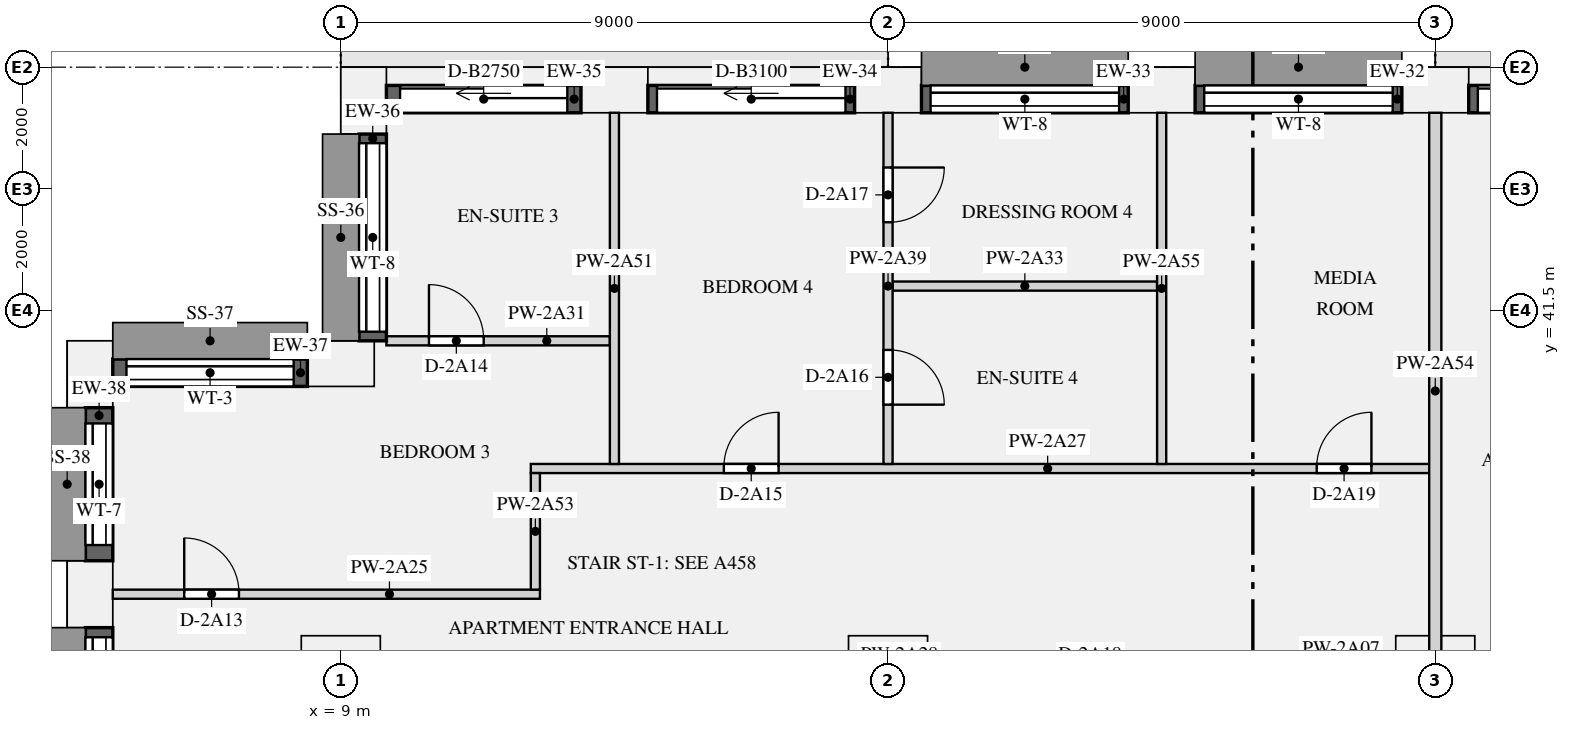
"""IFC4 building model, lengths in metres.
Left out: names, types, materials, properties, quantities, classifications, styles, units other than length and angle.
Written with IfcOpenShell. Run it as: python <this file> out.ifc"""

import sys

from ifc_helpers import new_model, si_unit, direction, frame, frame_2d, origin, origin_2d, place, context, subcontext, project, spatial, rectangle, extrude, element, fill, save


model = new_model("IFC4")
c1 = context("Model", 3, precision=1e-05, world=origin(), true_north=direction((0.0, 1.0)))
c2 = subcontext(c1, "Body", "Model", "MODEL_VIEW")
j1 = project(units=[si_unit("LENGTHUNIT", "METRE"), si_unit("PLANEANGLEUNIT", "RADIAN")], contexts=[c1])
p1 = place(None, origin())
s1 = spatial("IfcSite", under=j1, at=p1, CompositionType="ELEMENT")
p2 = place(p1, origin())
s2 = spatial("IfcBuilding", under=s1, at=p2, CompositionType="ELEMENT")
p3 = place(p2, frame((0.0, 0.0, 83.55)))
s3 = spatial("IfcBuildingStorey", under=s2, at=p3, CompositionType="ELEMENT", Elevation=83.55)
for number, where, z_axis, x_axis in (
    (1, (27.0, 45.125, 0.0), (0.0, 0.0, 1.0), (-1.0, 0.0, 0.0)),
    (2, (22.5, 45.125, 0.0), (0.0, 0.0, 1.0), (-1.0, 0.0, 0.0)),
    (3, (18.0, 45.125, 0.0), (0.0, 0.0, 1.0), (-1.0, 0.0, 0.0)),
    (4, (13.5, 45.125, 0.0), (0.0, 0.0, 1.0), (-1.0, 0.0, 0.0)),
    (5, (9.375, 44.95, 0.0), (0.0, 0.0, 1.0), (0.0, -1.0, 0.0)),
    (6, (9.0, 40.625, 0.0), (0.0, 0.0, 1.0), (-1.0, 0.0, 0.0)),
    (7, (4.875, 40.45, 0.0), (0.0, 0.0, 1.0), (0.0, -1.0, 0.0)),
    (8, (4.875, 36.833, 0.0), (0.0, 0.0, 1.0), (0.0, -1.0, 0.0)),
):
    element("IfcColumn", number, at=place(p3, frame(where, z_axis=z_axis, x_axis=x_axis)), inside=s3, PredefinedType="USERDEFINED", context=c2, shape_type="SweptSolid", body=[
        extrude(rectangle(XDim=1.1, YDim=0.75, at=origin_2d()), origin(), (0.0, 0.0, 1.0), 3.15),
    ])
for number, where, z_axis, x_axis in (
    (9, (9.0, 35.5, 0.0), (0.0, 0.0, 1.0), (1.0, 0.0, 0.0)),
    (10, (18.0, 35.5, 0.0), (0.0, 0.0, 1.0), (1.0, 0.0, 0.0)),
    (11, (27.0, 35.5, 0.0), (0.0, 0.0, 1.0), (1.0, 0.0, 0.0)),
):
    element("IfcColumn", number, at=place(p3, frame(where, z_axis=z_axis, x_axis=x_axis)), inside=s3, PredefinedType="COLUMN", context=c2, shape_type="SweptSolid", body=[
        extrude(rectangle(XDim=1.3, YDim=1.3, at=origin_2d()), origin(), (0.0, 0.0, 1.0), 3.15),
    ])
p4 = place(p3, frame((30.95, 44.975, 0.0), z_axis=(0.0, 0.0, 1.0), x_axis=(-1.0, 0.0, 0.0)))
e12 = element("IfcWall", 12, at=p4, inside=s3, PredefinedType="SOLIDWALL", context=c2, shape_type="SweptSolid", body=[
    extrude(rectangle(XDim=3.4, YDim=0.45, at=frame_2d((1.7, 0.0))), origin(), (0.0, 0.0, 1.0), 2.83),
])
p5 = place(p4, frame((0.15, 0.0, 0.0)))
e13 = element("IfcOpeningElement", 13, at=p5, cuts=e12, PredefinedType="OPENING", context=c2, shape_type="SweptSolid", body=[
    extrude(rectangle(XDim=3.1, YDim=2.3, at=frame_2d((1.55, 1.15))), frame((0.0, 0.235, 0.0), z_axis=(0.0, -1.0, 0.0), x_axis=(1.0, 0.0, 0.0)), (0.0, 0.0, 1.0), 0.47),
])
p6 = place(p3, frame((26.45, 44.975, 0.9), z_axis=(0.0, 0.0, 1.0), x_axis=(-1.0, 0.0, 0.0)))
e14 = element("IfcWall", 14, at=p6, inside=s3, PredefinedType="SOLIDWALL", context=c2, shape_type="SweptSolid", body=[
    extrude(rectangle(XDim=3.4, YDim=0.45, at=frame_2d((1.7, 0.0))), origin(), (0.0, 0.0, 1.0), 1.93),
])
p7 = place(p6, frame((0.15, 0.0, 0.15)))
e15 = element("IfcOpeningElement", 15, at=p7, cuts=e14, PredefinedType="OPENING", context=c2, shape_type="SweptSolid", body=[
    extrude(rectangle(XDim=3.1, YDim=1.5, at=frame_2d((1.55, 0.75))), frame((0.0, 0.235, 0.0), z_axis=(0.0, -1.0, 0.0), x_axis=(1.0, 0.0, 0.0)), (0.0, 0.0, 1.0), 0.47),
])
p8 = place(p3, frame((21.95, 44.975, 0.9), z_axis=(0.0, 0.0, 1.0), x_axis=(-1.0, 0.0, 0.0)))
e16 = element("IfcWall", 16, at=p8, inside=s3, PredefinedType="SOLIDWALL", context=c2, shape_type="SweptSolid", body=[
    extrude(rectangle(XDim=3.4, YDim=0.45, at=frame_2d((1.7, 0.0))), origin(), (0.0, 0.0, 1.0), 1.93),
])
p9 = place(p8, frame((0.15, 0.0, 0.15)))
e17 = element("IfcOpeningElement", 17, at=p9, cuts=e16, PredefinedType="OPENING", context=c2, shape_type="SweptSolid", body=[
    extrude(rectangle(XDim=3.1, YDim=1.5, at=frame_2d((1.55, 0.75))), frame((0.0, 0.235, 0.0), z_axis=(0.0, -1.0, 0.0), x_axis=(1.0, 0.0, 0.0)), (0.0, 0.0, 1.0), 0.47),
])
p10 = place(p3, frame((17.45, 44.975, 0.0), z_axis=(0.0, 0.0, 1.0), x_axis=(-1.0, 0.0, 0.0)))
e18 = element("IfcWall", 18, at=p10, inside=s3, PredefinedType="SOLIDWALL", context=c2, shape_type="SweptSolid", body=[
    extrude(rectangle(XDim=3.4, YDim=0.45, at=frame_2d((1.7, 0.0))), origin(), (0.0, 0.0, 1.0), 2.83),
])
p11 = place(p10, frame((0.15, 0.0, 0.0)))
e19 = element("IfcOpeningElement", 19, at=p11, cuts=e18, PredefinedType="OPENING", context=c2, shape_type="SweptSolid", body=[
    extrude(rectangle(XDim=3.1, YDim=2.3, at=frame_2d((1.55, 1.15))), frame((0.0, 0.235, 0.0), z_axis=(0.0, -1.0, 0.0), x_axis=(1.0, 0.0, 0.0)), (0.0, 0.0, 1.0), 0.47),
])
p12 = place(p3, frame((12.95, 44.975, 0.0), z_axis=(0.0, 0.0, 1.0), x_axis=(-1.0, 0.0, 0.0)))
e20 = element("IfcWall", 20, at=p12, inside=s3, PredefinedType="SOLIDWALL", context=c2, shape_type="SweptSolid", body=[
    extrude(rectangle(XDim=3.2, YDim=0.45, at=frame_2d((1.6, 0.0))), origin(), (0.0, 0.0, 1.0), 2.83),
])
p13 = place(p12, frame((0.225, 0.0, 0.0)))
e21 = element("IfcOpeningElement", 21, at=p13, cuts=e20, PredefinedType="OPENING", context=c2, shape_type="SweptSolid", body=[
    extrude(rectangle(XDim=2.75, YDim=2.3, at=frame_2d((1.375, 1.15))), frame((0.0, 0.235, 0.0), z_axis=(0.0, -1.0, 0.0), x_axis=(1.0, 0.0, 0.0)), (0.0, 0.0, 1.0), 0.47),
])
p14 = place(p3, frame((9.525, 44.4, 0.9), z_axis=(0.0, 0.0, 1.0), x_axis=(0.0, -1.0, 0.0)))
e22 = element("IfcWall", 22, at=p14, inside=s3, PredefinedType="SOLIDWALL", context=c2, shape_type="SweptSolid", body=[
    extrude(rectangle(XDim=3.4, YDim=0.45, at=frame_2d((1.7, 0.0))), origin(), (0.0, 0.0, 1.0), 1.93),
])
p15 = place(p14, frame((0.15, 0.0, 0.15)))
e23 = element("IfcOpeningElement", 23, at=p15, cuts=e22, PredefinedType="OPENING", context=c2, shape_type="SweptSolid", body=[
    extrude(rectangle(XDim=3.1, YDim=1.5, at=frame_2d((1.55, 0.75))), frame((0.0, 0.235, 0.0), z_axis=(0.0, -1.0, 0.0), x_axis=(1.0, 0.0, 0.0)), (0.0, 0.0, 1.0), 0.47),
])
p16 = place(p3, frame((8.45, 40.475, 0.9), z_axis=(0.0, 0.0, 1.0), x_axis=(-1.0, 0.0, 0.0)))
e24 = element("IfcWall", 24, at=p16, inside=s3, PredefinedType="SOLIDWALL", context=c2, shape_type="SweptSolid", body=[
    extrude(rectangle(XDim=3.2, YDim=0.45, at=frame_2d((1.6, 0.0))), origin(), (0.0, 0.0, 1.0), 1.93),
])
p17 = place(p16, frame((0.225, 0.0, 0.15)))
e25 = element("IfcOpeningElement", 25, at=p17, cuts=e24, PredefinedType="OPENING", context=c2, shape_type="SweptSolid", body=[
    extrude(rectangle(XDim=2.75, YDim=1.5, at=frame_2d((1.375, 0.75))), frame((0.0, 0.235, 0.0), z_axis=(0.0, -1.0, 0.0), x_axis=(1.0, 0.0, 0.0)), (0.0, 0.0, 1.0), 0.47),
])
p18 = place(p3, frame((5.025, 39.9, 0.9), z_axis=(0.0, 0.0, 1.0), x_axis=(0.0, -1.0, 0.0)))
e26 = element("IfcWall", 26, at=p18, inside=s3, PredefinedType="SOLIDWALL", context=c2, shape_type="SweptSolid", body=[
    extrude(rectangle(XDim=2.517, YDim=0.45, at=frame_2d((1.258, 0.0))), origin(), (0.0, 0.0, 1.0), 1.93),
])
p19 = place(p18, frame((0.259, 0.0, 0.15)))
e27 = element("IfcOpeningElement", 27, at=p19, cuts=e26, PredefinedType="OPENING", context=c2, shape_type="SweptSolid", body=[
    extrude(rectangle(XDim=2.0, YDim=1.5, at=frame_2d((1.0, 0.75))), frame((0.0, 0.235, 0.0), z_axis=(0.0, -1.0, 0.0), x_axis=(1.0, 0.0, 0.0)), (0.0, 0.0, 1.0), 0.47),
])
p20 = place(p3, frame((5.025, 36.283, 0.9), z_axis=(0.0, 0.0, 1.0), x_axis=(0.0, -1.0, 0.0)))
e28 = element("IfcWall", 28, at=p20, inside=s3, PredefinedType="SOLIDWALL", context=c2, shape_type="SweptSolid", body=[
    extrude(rectangle(XDim=3.066, YDim=0.45, at=frame_2d((1.533, 0.0))), origin(), (0.0, 0.0, 1.0), 1.93),
])
p21 = place(p20, frame((0.158, 0.0, 0.15)))
e29 = element("IfcOpeningElement", 29, at=p21, cuts=e28, PredefinedType="OPENING", context=c2, shape_type="SweptSolid", body=[
    extrude(rectangle(XDim=2.75, YDim=1.5, at=frame_2d((1.375, 0.75))), frame((0.0, 0.235, 0.0), z_axis=(0.0, -1.0, 0.0), x_axis=(1.0, 0.0, 0.0)), (0.0, 0.0, 1.0), 0.47),
])
p22 = place(p3, frame((5.25, 36.833, 0.0), z_axis=(0.0, 0.0, 1.0), x_axis=(1.0, 0.0, 0.0)))
e30 = element("IfcWall", 30, at=p22, inside=s3, PredefinedType="PARTITIONING", context=c2, shape_type="SweptSolid", body=[
    extrude(rectangle(XDim=7.025, YDim=0.15, at=frame_2d((3.512, 0.0))), origin(), (0.0, 0.0, 1.0), 2.83),
])
p23 = place(p22, frame((1.175, 0.0, 0.0)))
e31 = element("IfcOpeningElement", 31, at=p23, cuts=e30, PredefinedType="OPENING", context=c2, shape_type="SweptSolid", body=[
    extrude(rectangle(XDim=0.9, YDim=2.1, at=frame_2d((0.45, 1.05))), frame((0.0, 0.085, 0.0), z_axis=(0.0, -1.0, 0.0), x_axis=(1.0, 0.0, 0.0)), (0.0, 0.0, 1.0), 0.17),
])
p24 = place(p3, frame((12.125, 38.9, 0.0), z_axis=(0.0, 0.0, 1.0), x_axis=(1.0, 0.0, 0.0)))
e32 = element("IfcWall", 32, at=p24, inside=s3, PredefinedType="PARTITIONING", context=c2, shape_type="SweptSolid", body=[
    extrude(rectangle(XDim=14.775, YDim=0.15, at=frame_2d((7.387, 0.0))), origin(), (0.0, 0.0, 1.0), 2.83),
])
p25 = place(p24, frame((3.175, 0.0, 0.0)))
e33 = element("IfcOpeningElement", 33, at=p25, cuts=e32, PredefinedType="OPENING", context=c2, shape_type="SweptSolid", body=[
    extrude(rectangle(XDim=0.9, YDim=2.1, at=frame_2d((0.45, 1.05))), frame((0.0, 0.085, 0.0), z_axis=(0.0, -1.0, 0.0), x_axis=(1.0, 0.0, 0.0)), (0.0, 0.0, 1.0), 0.17),
])
p26 = place(p24, frame((12.925, 0.0, 0.0)))
e34 = element("IfcOpeningElement", 34, at=p26, cuts=e32, PredefinedType="OPENING", context=c2, shape_type="SweptSolid", body=[
    extrude(rectangle(XDim=0.9, YDim=2.1, at=frame_2d((0.45, 1.05))), frame((0.0, 0.085, 0.0), z_axis=(0.0, -1.0, 0.0), x_axis=(1.0, 0.0, 0.0)), (0.0, 0.0, 1.0), 0.17),
])
p27 = place(p3, frame((9.75, 41.0, 0.0), z_axis=(0.0, 0.0, 1.0), x_axis=(1.0, 0.0, 0.0)))
e35 = element("IfcWall", 35, at=p27, inside=s3, PredefinedType="PARTITIONING", context=c2, shape_type="SweptSolid", body=[
    extrude(rectangle(XDim=3.675, YDim=0.15, at=frame_2d((1.837, 0.0))), origin(), (0.0, 0.0, 1.0), 2.83),
])
p28 = place(p27, frame((0.7, 0.0, 0.0)))
e36 = element("IfcOpeningElement", 36, at=p28, cuts=e35, PredefinedType="OPENING", context=c2, shape_type="SweptSolid", body=[
    extrude(rectangle(XDim=0.9, YDim=2.1, at=frame_2d((0.45, 1.05))), frame((0.0, 0.085, 0.0), z_axis=(0.0, -1.0, 0.0), x_axis=(1.0, 0.0, 0.0)), (0.0, 0.0, 1.0), 0.17),
])
p29 = place(p3, frame((18.075, 41.9, 0.0), z_axis=(0.0, 0.0, 1.0), x_axis=(1.0, 0.0, 0.0)))
e37 = element("IfcWall", 37, at=p29, inside=s3, PredefinedType="PARTITIONING", context=c2, shape_type="SweptSolid", body=[
    extrude(rectangle(XDim=4.35, YDim=0.15, at=frame_2d((2.175, 0.0))), origin(), (0.0, 0.0, 1.0), 2.83),
])
p30 = place(p3, frame((18.0, 38.975, 0.0), z_axis=(0.0, 0.0, 1.0), x_axis=(0.0, 1.0, 0.0)))
e38 = element("IfcWall", 38, at=p30, inside=s3, PredefinedType="PARTITIONING", context=c2, shape_type="SweptSolid", body=[
    extrude(rectangle(XDim=5.775, YDim=0.15, at=frame_2d((2.887, 0.0))), origin(), (0.0, 0.0, 1.0), 2.83),
])
p31 = place(p30, frame((0.975, 0.0, 0.0)))
e39 = element("IfcOpeningElement", 39, at=p31, cuts=e38, PredefinedType="OPENING", context=c2, shape_type="SweptSolid", body=[
    extrude(rectangle(XDim=0.9, YDim=2.1, at=frame_2d((0.45, 1.05))), frame((0.0, 0.085, 0.0), z_axis=(0.0, -1.0, 0.0), x_axis=(1.0, 0.0, 0.0)), (0.0, 0.0, 1.0), 0.17),
])
p32 = place(p30, frame((3.975, 0.0, 0.0)))
e40 = element("IfcOpeningElement", 40, at=p32, cuts=e38, PredefinedType="OPENING", context=c2, shape_type="SweptSolid", body=[
    extrude(rectangle(XDim=0.9, YDim=2.1, at=frame_2d((0.45, 1.05))), frame((0.0, 0.085, 0.0), z_axis=(0.0, -1.0, 0.0), x_axis=(1.0, 0.0, 0.0)), (0.0, 0.0, 1.0), 0.17),
])
p33 = place(p3, frame((13.5, 38.975, 0.0), z_axis=(0.0, 0.0, 1.0), x_axis=(0.0, 1.0, 0.0)))
e41 = element("IfcWall", 41, at=p33, inside=s3, PredefinedType="PARTITIONING", context=c2, shape_type="SweptSolid", body=[
    extrude(rectangle(XDim=5.775, YDim=0.15, at=frame_2d((2.887, 0.0))), origin(), (0.0, 0.0, 1.0), 2.83),
])
p34 = place(p3, frame((12.2, 36.908, 0.0), z_axis=(0.0, 0.0, 1.0), x_axis=(0.0, 1.0, 0.0)))
e42 = element("IfcWall", 42, at=p34, inside=s3, PredefinedType="PARTITIONING", context=c2, shape_type="SweptSolid", body=[
    extrude(rectangle(XDim=1.917, YDim=0.15, at=frame_2d((0.958, 0.0))), origin(), (0.0, 0.0, 1.0), 2.83),
])
p35 = place(p3, frame((27.0, 35.6, 0.0), z_axis=(0.0, 0.0, 1.0), x_axis=(0.0, 1.0, 0.0)))
e43 = element("IfcWall", 43, at=p35, inside=s3, PredefinedType="PARTITIONING", context=c2, shape_type="SweptSolid", body=[
    extrude(rectangle(XDim=9.15, YDim=0.2, at=frame_2d((4.575, 0.0))), origin(), (0.0, 0.0, 1.0), 2.83),
])
p36 = place(p3, frame((22.5, 38.975, 0.0), z_axis=(0.0, 0.0, 1.0), x_axis=(0.0, 1.0, 0.0)))
e44 = element("IfcWall", 44, at=p36, inside=s3, PredefinedType="PARTITIONING", context=c2, shape_type="SweptSolid", body=[
    extrude(rectangle(XDim=5.775, YDim=0.15, at=frame_2d((2.887, 0.0))), origin(), (0.0, 0.0, 1.0), 2.83),
])
p37 = place(p5, origin())
e45 = element("IfcDoor", 45, at=p37, inside=s3, OperationType="SLIDING_TO_LEFT", PredefinedType="DOOR", context=c2, shape_type="SweptSolid", body=[
    extrude(rectangle(XDim=3.1, YDim=2.3, at=frame_2d((1.55, 1.15))), frame((0.0, -0.07, 0.0), z_axis=(0.0, -1.0, 0.0), x_axis=(1.0, 0.0, 0.0)), (0.0, 0.0, 1.0), 0.05),
])
fill(e13, e45)
p38 = place(p7, origin())
e46 = element("IfcWindow", 46, at=p38, inside=s3, PartitioningType="SINGLE_PANEL", PredefinedType="WINDOW", context=c2, shape_type="SweptSolid", body=[
    extrude(rectangle(XDim=3.1, YDim=1.5, at=frame_2d((1.55, 0.75))), frame((0.0, -0.065, 0.0), z_axis=(0.0, -1.0, 0.0), x_axis=(1.0, 0.0, 0.0)), (0.0, 0.0, 1.0), 0.06),
])
fill(e15, e46)
p39 = place(p9, origin())
e47 = element("IfcWindow", 47, at=p39, inside=s3, PartitioningType="SINGLE_PANEL", PredefinedType="WINDOW", context=c2, shape_type="SweptSolid", body=[
    extrude(rectangle(XDim=3.1, YDim=1.5, at=frame_2d((1.55, 0.75))), frame((0.0, -0.065, 0.0), z_axis=(0.0, -1.0, 0.0), x_axis=(1.0, 0.0, 0.0)), (0.0, 0.0, 1.0), 0.06),
])
fill(e17, e47)
p40 = place(p11, origin())
e48 = element("IfcDoor", 48, at=p40, inside=s3, OperationType="SLIDING_TO_LEFT", PredefinedType="DOOR", context=c2, shape_type="SweptSolid", body=[
    extrude(rectangle(XDim=3.1, YDim=2.3, at=frame_2d((1.55, 1.15))), frame((0.0, -0.07, 0.0), z_axis=(0.0, -1.0, 0.0), x_axis=(1.0, 0.0, 0.0)), (0.0, 0.0, 1.0), 0.05),
])
fill(e19, e48)
p41 = place(p13, origin())
e49 = element("IfcDoor", 49, at=p41, inside=s3, OperationType="SLIDING_TO_LEFT", PredefinedType="DOOR", context=c2, shape_type="SweptSolid", body=[
    extrude(rectangle(XDim=2.75, YDim=2.3, at=frame_2d((1.375, 1.15))), frame((0.0, -0.07, 0.0), z_axis=(0.0, -1.0, 0.0), x_axis=(1.0, 0.0, 0.0)), (0.0, 0.0, 1.0), 0.05),
])
fill(e21, e49)
p42 = place(p15, origin())
e50 = element("IfcWindow", 50, at=p42, inside=s3, PartitioningType="SINGLE_PANEL", PredefinedType="WINDOW", context=c2, shape_type="SweptSolid", body=[
    extrude(rectangle(XDim=3.1, YDim=1.5, at=frame_2d((1.55, 0.75))), frame((0.0, -0.065, 0.0), z_axis=(0.0, -1.0, 0.0), x_axis=(1.0, 0.0, 0.0)), (0.0, 0.0, 1.0), 0.06),
])
fill(e23, e50)
p43 = place(p17, origin())
e51 = element("IfcWindow", 51, at=p43, inside=s3, PartitioningType="SINGLE_PANEL", PredefinedType="WINDOW", context=c2, shape_type="SweptSolid", body=[
    extrude(rectangle(XDim=2.75, YDim=1.5, at=frame_2d((1.375, 0.75))), frame((0.0, -0.065, 0.0), z_axis=(0.0, -1.0, 0.0), x_axis=(1.0, 0.0, 0.0)), (0.0, 0.0, 1.0), 0.06),
])
fill(e25, e51)
p44 = place(p19, origin())
e52 = element("IfcWindow", 52, at=p44, inside=s3, PartitioningType="SINGLE_PANEL", PredefinedType="WINDOW", context=c2, shape_type="SweptSolid", body=[
    extrude(rectangle(XDim=2.0, YDim=1.5, at=frame_2d((1.0, 0.75))), frame((0.0, -0.065, 0.0), z_axis=(0.0, -1.0, 0.0), x_axis=(1.0, 0.0, 0.0)), (0.0, 0.0, 1.0), 0.06),
])
fill(e27, e52)
p45 = place(p21, origin())
e53 = element("IfcWindow", 53, at=p45, inside=s3, PartitioningType="SINGLE_PANEL", PredefinedType="WINDOW", context=c2, shape_type="SweptSolid", body=[
    extrude(rectangle(XDim=2.75, YDim=1.5, at=frame_2d((1.375, 0.75))), frame((0.0, -0.065, 0.0), z_axis=(0.0, -1.0, 0.0), x_axis=(1.0, 0.0, 0.0)), (0.0, 0.0, 1.0), 0.06),
])
fill(e29, e53)
p46 = place(p23, origin())
e54 = element("IfcDoor", 54, at=p46, inside=s3, OperationType="SINGLE_SWING_LEFT", PredefinedType="DOOR", context=c2, shape_type="SweptSolid", body=[
    extrude(rectangle(XDim=0.9, YDim=2.1, at=frame_2d((0.45, 1.05))), frame((0.0, 0.025, 0.0), z_axis=(0.0, -1.0, 0.0), x_axis=(1.0, 0.0, 0.0)), (0.0, 0.0, 1.0), 0.05),
])
fill(e31, e54)
p47 = place(p28, origin())
e55 = element("IfcDoor", 55, at=p47, inside=s3, OperationType="SINGLE_SWING_LEFT", PredefinedType="DOOR", context=c2, shape_type="SweptSolid", body=[
    extrude(rectangle(XDim=0.9, YDim=2.1, at=frame_2d((0.45, 1.05))), frame((0.0, 0.025, 0.0), z_axis=(0.0, -1.0, 0.0), x_axis=(1.0, 0.0, 0.0)), (0.0, 0.0, 1.0), 0.05),
])
fill(e36, e55)
p48 = place(p25, origin())
e56 = element("IfcDoor", 56, at=p48, inside=s3, OperationType="SINGLE_SWING_RIGHT", PredefinedType="DOOR", context=c2, shape_type="SweptSolid", body=[
    extrude(rectangle(XDim=0.9, YDim=2.1, at=frame_2d((0.45, 1.05))), frame((0.0, 0.025, 0.0), z_axis=(0.0, -1.0, 0.0), x_axis=(1.0, 0.0, 0.0)), (0.0, 0.0, 1.0), 0.05),
])
fill(e33, e56)
p49 = place(p31, frame((0.9, 0.0, 0.0), z_axis=(0.0, 0.0, 1.0), x_axis=(-1.0, 0.0, 0.0)))
e57 = element("IfcDoor", 57, at=p49, inside=s3, OperationType="SINGLE_SWING_RIGHT", PredefinedType="DOOR", context=c2, shape_type="SweptSolid", body=[
    extrude(rectangle(XDim=0.9, YDim=2.1, at=frame_2d((0.45, 1.05))), frame((0.0, 0.025, 0.0), z_axis=(0.0, -1.0, 0.0), x_axis=(1.0, 0.0, 0.0)), (0.0, 0.0, 1.0), 0.05),
])
fill(e39, e57)
p50 = place(p32, frame((0.9, 0.0, 0.0), z_axis=(0.0, 0.0, 1.0), x_axis=(-1.0, 0.0, 0.0)))
e58 = element("IfcDoor", 58, at=p50, inside=s3, OperationType="SINGLE_SWING_LEFT", PredefinedType="DOOR", context=c2, shape_type="SweptSolid", body=[
    extrude(rectangle(XDim=0.9, YDim=2.1, at=frame_2d((0.45, 1.05))), frame((0.0, 0.025, 0.0), z_axis=(0.0, -1.0, 0.0), x_axis=(1.0, 0.0, 0.0)), (0.0, 0.0, 1.0), 0.05),
])
fill(e40, e58)
p51 = place(p26, origin())
e59 = element("IfcDoor", 59, at=p51, inside=s3, OperationType="SINGLE_SWING_RIGHT", PredefinedType="DOOR", context=c2, shape_type="SweptSolid", body=[
    extrude(rectangle(XDim=0.9, YDim=2.1, at=frame_2d((0.45, 1.05))), frame((0.0, 0.025, 0.0), z_axis=(0.0, -1.0, 0.0), x_axis=(1.0, 0.0, 0.0)), (0.0, 0.0, 1.0), 0.05),
])
fill(e34, e59)
save(model, sys.argv[1])
